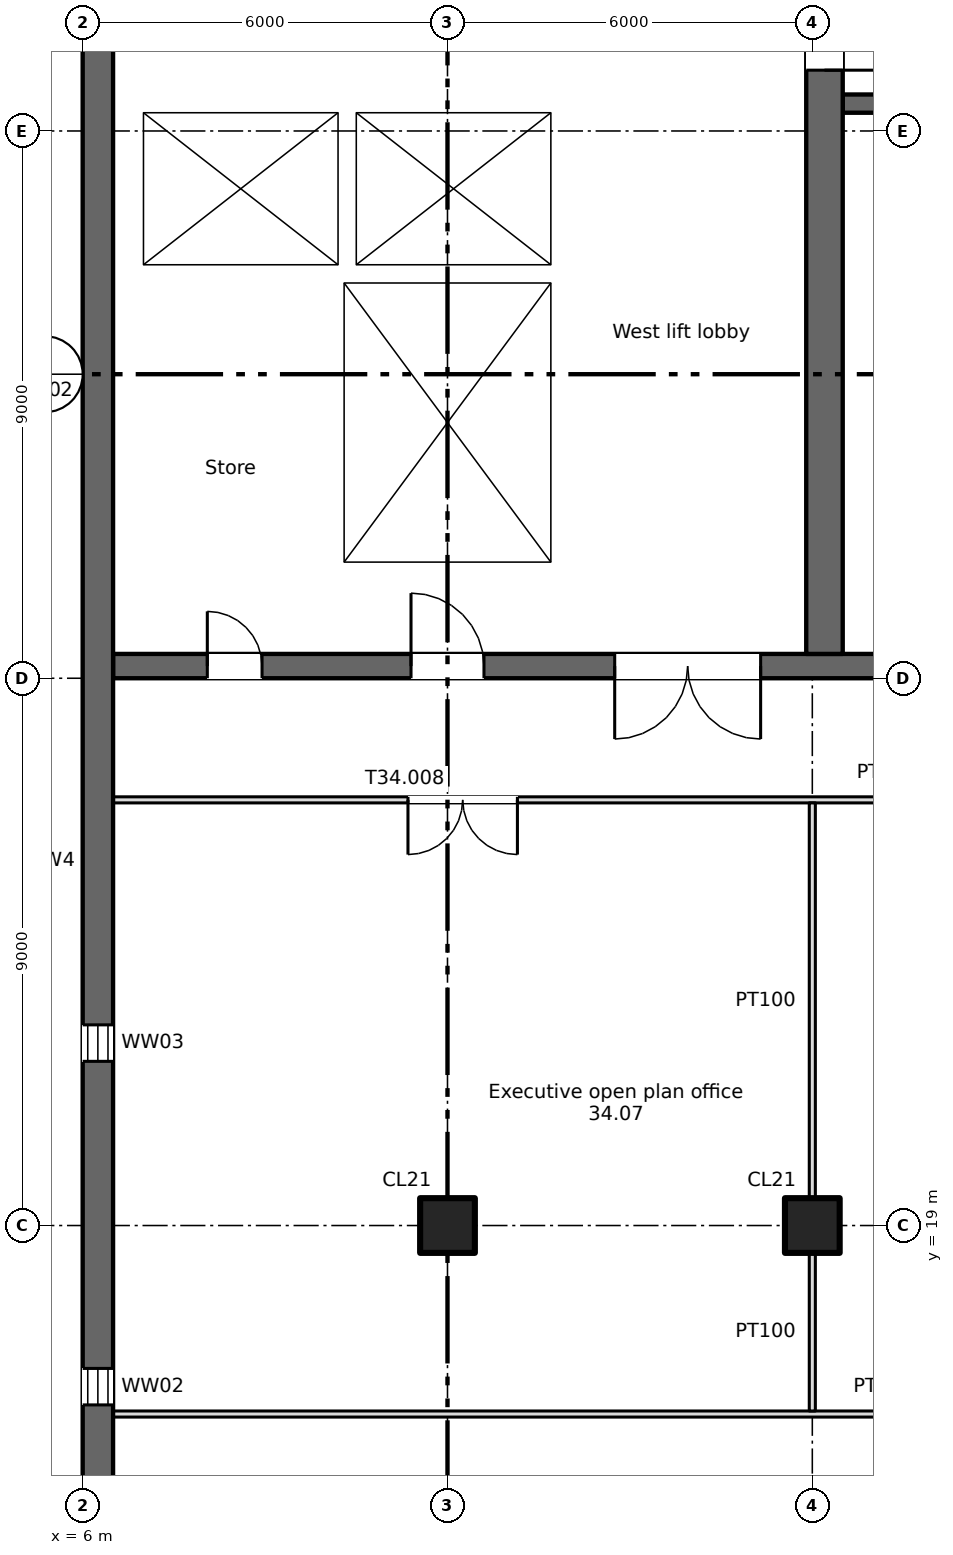
"""IFC4 building model, lengths in metres.
Left out: names, types, materials, properties, quantities, classifications, styles, units other than length and angle.
Written with IfcOpenShell. Run it as: python <this file> out.ifc"""

import sys

from ifc_helpers import new_model, si_unit, direction, frame, frame_2d, origin, origin_2d, place, context, subcontext, project, spatial, rectangle, extrude, element, fill, save


model = new_model("IFC4")
c1 = context("Model", 3, precision=1e-05, world=origin(), true_north=direction((0.0, 1.0)))
c2 = subcontext(c1, "Body", "Model", "MODEL_VIEW")
j1 = project(units=[si_unit("LENGTHUNIT", "METRE"), si_unit("PLANEANGLEUNIT", "RADIAN")], contexts=[c1])
p1 = place(None, origin())
s1 = spatial("IfcSite", under=j1, at=p1, CompositionType="ELEMENT")
p2 = place(p1, origin())
s2 = spatial("IfcBuilding", under=s1, at=p2, CompositionType="ELEMENT")
p3 = place(p2, frame((0.0, 0.0, 239.35)))
s3 = spatial("IfcBuildingStorey", under=s2, at=p3, CompositionType="ELEMENT", Elevation=239.35)
for number, where, z_axis, x_axis in (
    (1, (12.0, 19.0, 0.0), (0.0, 0.0, 1.0), (1.0, 0.0, 0.0)),
    (2, (18.0, 19.0, 0.0), (0.0, 0.0, 1.0), (1.0, 0.0, 0.0)),
):
    element("IfcColumn", number, at=place(p3, frame(where, z_axis=z_axis, x_axis=x_axis)), inside=s3, PredefinedType="COLUMN", context=c2, shape_type="SweptSolid", body=[
        extrude(rectangle(XDim=0.9, YDim=0.9, at=origin_2d()), origin(), (0.0, 0.0, 1.0), 3.4),
    ])
p4 = place(p3, frame((6.25, 8.5, 0.0), z_axis=(0.0, 0.0, 1.0), x_axis=(0.0, 1.0, 0.0)))
e3 = element("IfcWall", 3, at=p4, inside=s3, PredefinedType="SHEAR", context=c2, shape_type="SweptSolid", body=[
    extrude(rectangle(XDim=33.0, YDim=0.5, at=frame_2d((16.5, 0.0))), origin(), (0.0, 0.0, 1.0), 3.4),
])
p5 = place(p4, frame((1.6, 0.0, 0.6)))
e4 = element("IfcOpeningElement", 4, at=p5, cuts=e3, PredefinedType="OPENING", context=c2, shape_type="SweptSolid", body=[
    extrude(rectangle(XDim=0.6, YDim=2.4, at=frame_2d((0.3, 1.2))), frame((0.0, 0.26, 0.0), z_axis=(0.0, -1.0, 0.0), x_axis=(1.0, 0.0, 0.0)), (0.0, 0.0, 1.0), 0.52),
])
p6 = place(p4, frame((7.55, 0.0, 0.6)))
e5 = element("IfcOpeningElement", 5, at=p6, cuts=e3, PredefinedType="OPENING", context=c2, shape_type="SweptSolid", body=[
    extrude(rectangle(XDim=0.6, YDim=2.4, at=frame_2d((0.3, 1.2))), frame((0.0, 0.26, 0.0), z_axis=(0.0, -1.0, 0.0), x_axis=(1.0, 0.0, 0.0)), (0.0, 0.0, 1.0), 0.52),
])
p7 = place(p4, frame((13.2, 0.0, 0.6)))
e6 = element("IfcOpeningElement", 6, at=p7, cuts=e3, PredefinedType="OPENING", context=c2, shape_type="SweptSolid", body=[
    extrude(rectangle(XDim=0.6, YDim=2.4, at=frame_2d((0.3, 1.2))), frame((0.0, 0.26, 0.0), z_axis=(0.0, -1.0, 0.0), x_axis=(1.0, 0.0, 0.0)), (0.0, 0.0, 1.0), 0.52),
])
p8 = place(p3, frame((6.5, 28.2, 0.0), z_axis=(0.0, 0.0, 1.0), x_axis=(1.0, 0.0, 0.0)))
e7 = element("IfcWall", 7, at=p8, inside=s3, PredefinedType="SHEAR", context=c2, shape_type="SweptSolid", body=[
    extrude(rectangle(XDim=58.0, YDim=0.4, at=frame_2d((29.0, 0.0))), origin(), (0.0, 0.0, 1.0), 3.4),
])
p9 = place(p8, frame((14.05, 0.0, 0.0)))
e8 = element("IfcOpeningElement", 8, at=p9, cuts=e7, PredefinedType="OPENING", context=c2, shape_type="SweptSolid", body=[
    extrude(rectangle(XDim=0.9, YDim=2.1, at=frame_2d((0.45, 1.05))), frame((0.0, 0.21, 0.0), z_axis=(0.0, -1.0, 0.0), x_axis=(1.0, 0.0, 0.0)), (0.0, 0.0, 1.0), 0.42),
])
p10 = place(p8, frame((48.762, 0.0, 0.0)))
e9 = element("IfcOpeningElement", 9, at=p10, cuts=e7, PredefinedType="OPENING", context=c2, shape_type="SweptSolid", body=[
    extrude(rectangle(XDim=0.9, YDim=2.1, at=frame_2d((0.45, 1.05))), frame((0.0, 0.21, 0.0), z_axis=(0.0, -1.0, 0.0), x_axis=(1.0, 0.0, 0.0)), (0.0, 0.0, 1.0), 0.42),
])
p11 = place(p8, frame((51.337, 0.0, 0.0)))
e10 = element("IfcOpeningElement", 10, at=p11, cuts=e7, PredefinedType="OPENING", context=c2, shape_type="SweptSolid", body=[
    extrude(rectangle(XDim=0.9, YDim=2.1, at=frame_2d((0.45, 1.05))), frame((0.0, 0.21, 0.0), z_axis=(0.0, -1.0, 0.0), x_axis=(1.0, 0.0, 0.0)), (0.0, 0.0, 1.0), 0.42),
])
p12 = place(p8, frame((1.55, 0.0, 0.0)))
e11 = element("IfcOpeningElement", 11, at=p12, cuts=e7, PredefinedType="OPENING", context=c2, shape_type="SweptSolid", body=[
    extrude(rectangle(XDim=0.9, YDim=2.1, at=frame_2d((0.45, 1.05))), frame((0.0, 0.21, 0.0), z_axis=(0.0, -1.0, 0.0), x_axis=(1.0, 0.0, 0.0)), (0.0, 0.0, 1.0), 0.42),
])
p13 = place(p8, frame((4.9, 0.0, 0.0)))
e12 = element("IfcOpeningElement", 12, at=p13, cuts=e7, PredefinedType="OPENING", context=c2, shape_type="SweptSolid", body=[
    extrude(rectangle(XDim=1.2, YDim=2.1, at=frame_2d((0.6, 1.05))), frame((0.0, 0.21, 0.0), z_axis=(0.0, -1.0, 0.0), x_axis=(1.0, 0.0, 0.0)), (0.0, 0.0, 1.0), 0.42),
])
p14 = place(p8, frame((31.9, 0.0, 0.0)))
e13 = element("IfcOpeningElement", 13, at=p14, cuts=e7, PredefinedType="OPENING", context=c2, shape_type="SweptSolid", body=[
    extrude(rectangle(XDim=1.2, YDim=2.1, at=frame_2d((0.6, 1.05))), frame((0.0, 0.21, 0.0), z_axis=(0.0, -1.0, 0.0), x_axis=(1.0, 0.0, 0.0)), (0.0, 0.0, 1.0), 0.42),
])
p15 = place(p8, frame((55.4, 0.0, 0.0)))
e14 = element("IfcOpeningElement", 14, at=p15, cuts=e7, PredefinedType="OPENING", context=c2, shape_type="SweptSolid", body=[
    extrude(rectangle(XDim=1.2, YDim=2.1, at=frame_2d((0.6, 1.05))), frame((0.0, 0.21, 0.0), z_axis=(0.0, -1.0, 0.0), x_axis=(1.0, 0.0, 0.0)), (0.0, 0.0, 1.0), 0.42),
])
p16 = place(p8, frame((21.9, 0.0, 0.0)))
e15 = element("IfcOpeningElement", 15, at=p16, cuts=e7, PredefinedType="OPENING", context=c2, shape_type="SweptSolid", body=[
    extrude(rectangle(XDim=1.2, YDim=2.1, at=frame_2d((0.6, 1.05))), frame((0.0, 0.21, 0.0), z_axis=(0.0, -1.0, 0.0), x_axis=(1.0, 0.0, 0.0)), (0.0, 0.0, 1.0), 0.42),
])
p17 = place(p8, frame((41.9, 0.0, 0.0)))
e16 = element("IfcOpeningElement", 16, at=p17, cuts=e7, PredefinedType="OPENING", context=c2, shape_type="SweptSolid", body=[
    extrude(rectangle(XDim=1.2, YDim=2.1, at=frame_2d((0.6, 1.05))), frame((0.0, 0.21, 0.0), z_axis=(0.0, -1.0, 0.0), x_axis=(1.0, 0.0, 0.0)), (0.0, 0.0, 1.0), 0.42),
])
p18 = place(p8, frame((25.05, 0.0, 0.0)))
e17 = element("IfcOpeningElement", 17, at=p18, cuts=e7, PredefinedType="OPENING", context=c2, shape_type="SweptSolid", body=[
    extrude(rectangle(XDim=2.4, YDim=2.1, at=frame_2d((1.2, 1.05))), frame((0.0, 0.21, 0.0), z_axis=(0.0, -1.0, 0.0), x_axis=(1.0, 0.0, 0.0)), (0.0, 0.0, 1.0), 0.42),
])
p19 = place(p8, frame((37.55, 0.0, 0.0)))
e18 = element("IfcOpeningElement", 18, at=p19, cuts=e7, PredefinedType="OPENING", context=c2, shape_type="SweptSolid", body=[
    extrude(rectangle(XDim=2.4, YDim=2.1, at=frame_2d((1.2, 1.05))), frame((0.0, 0.21, 0.0), z_axis=(0.0, -1.0, 0.0), x_axis=(1.0, 0.0, 0.0)), (0.0, 0.0, 1.0), 0.42),
])
p20 = place(p8, frame((8.25, 0.0, 0.0)))
e19 = element("IfcOpeningElement", 19, at=p20, cuts=e7, PredefinedType="OPENING", context=c2, shape_type="SweptSolid", body=[
    extrude(rectangle(XDim=2.4, YDim=2.1, at=frame_2d((1.2, 1.05))), frame((0.0, 0.21, 0.0), z_axis=(0.0, -1.0, 0.0), x_axis=(1.0, 0.0, 0.0)), (0.0, 0.0, 1.0), 0.42),
])
p21 = place(p8, frame((29.05, 0.0, 0.0)))
e20 = element("IfcOpeningElement", 20, at=p21, cuts=e7, PredefinedType="OPENING", context=c2, shape_type="SweptSolid", body=[
    extrude(rectangle(XDim=0.9, YDim=2.1, at=frame_2d((0.45, 1.05))), frame((0.0, 0.21, 0.0), z_axis=(0.0, -1.0, 0.0), x_axis=(1.0, 0.0, 0.0)), (0.0, 0.0, 1.0), 0.42),
])
p22 = place(p8, frame((35.05, 0.0, 0.0)))
e21 = element("IfcOpeningElement", 21, at=p22, cuts=e7, PredefinedType="OPENING", context=c2, shape_type="SweptSolid", body=[
    extrude(rectangle(XDim=0.9, YDim=2.1, at=frame_2d((0.45, 1.05))), frame((0.0, 0.21, 0.0), z_axis=(0.0, -1.0, 0.0), x_axis=(1.0, 0.0, 0.0)), (0.0, 0.0, 1.0), 0.42),
])
p23 = place(p3, frame((6.75, 28.4, 0.0), z_axis=(0.0, 0.0, 1.0), x_axis=(0.0, 1.0, 0.0)))
e22 = element("IfcWall", 22, at=p23, inside=s3, PredefinedType="SHEAR", context=c2, shape_type="SweptSolid", body=[
    extrude(rectangle(XDim=12.85, YDim=0.5, at=frame_2d((6.425, 0.0))), origin(), (0.0, 0.0, 1.0), 3.4),
])
p24 = place(p3, frame((18.2, 28.4, 0.0), z_axis=(0.0, 0.0, 1.0), x_axis=(0.0, 1.0, 0.0)))
e23 = element("IfcWall", 23, at=p24, inside=s3, PredefinedType="SHEAR", context=c2, shape_type="SweptSolid", body=[
    extrude(rectangle(XDim=17.0, YDim=0.6, at=frame_2d((8.5, 0.0))), origin(), (0.0, 0.0, 1.0), 3.4),
])
p25 = place(p24, frame((9.6, 0.0, 0.0)))
e24 = element("IfcOpeningElement", 24, at=p25, cuts=e23, PredefinedType="OPENING", context=c2, shape_type="SweptSolid", body=[
    extrude(rectangle(XDim=2.0, YDim=2.1, at=frame_2d((1.0, 1.05))), frame((0.0, 0.31, 0.0), z_axis=(0.0, -1.0, 0.0), x_axis=(1.0, 0.0, 0.0)), (0.0, 0.0, 1.0), 0.62),
])
p26 = place(p24, frame((15.45, 0.0, 0.0)))
e25 = element("IfcOpeningElement", 25, at=p26, cuts=e23, PredefinedType="OPENING", context=c2, shape_type="SweptSolid", body=[
    extrude(rectangle(XDim=1.2, YDim=2.1, at=frame_2d((0.6, 1.05))), frame((0.0, 0.31, 0.0), z_axis=(0.0, -1.0, 0.0), x_axis=(1.0, 0.0, 0.0)), (0.0, 0.0, 1.0), 0.62),
])
for number, where, z_axis, x_axis in (
    (26, (10.15, 28.4, 0.0), (0.0, 0.0, 1.0), (0.0, 1.0, 0.0)),
    (27, (13.85, 28.4, 0.0), (0.0, 0.0, 1.0), (0.0, 1.0, 0.0)),
):
    element("IfcWall", number, at=place(p3, frame(where, z_axis=z_axis, x_axis=x_axis)), inside=s3, PredefinedType="SHEAR", context=c2, shape_type="SweptSolid", body=[
        extrude(rectangle(XDim=6.1, YDim=0.3, at=frame_2d((3.05, 0.0))), origin(), (0.0, 0.0, 1.0), 3.4),
    ])
p27 = place(p3, frame((7.0, 34.65, 0.0), z_axis=(0.0, 0.0, 1.0), x_axis=(1.0, 0.0, 0.0)))
e28 = element("IfcWall", 28, at=p27, inside=s3, PredefinedType="SHEAR", context=c2, shape_type="SweptSolid", body=[
    extrude(rectangle(XDim=7.0, YDim=0.3, at=frame_2d((3.5, 0.0))), origin(), (0.0, 0.0, 1.0), 3.4),
])
p28 = place(p3, frame((18.5, 34.65, 0.0), z_axis=(0.0, 0.0, 1.0), x_axis=(1.0, 0.0, 0.0)))
e29 = element("IfcWall", 29, at=p28, inside=s3, PredefinedType="SHEAR", context=c2, shape_type="SweptSolid", body=[
    extrude(rectangle(XDim=12.2, YDim=0.3, at=frame_2d((6.1, 0.0))), origin(), (0.0, 0.0, 1.0), 3.4),
])
p29 = place(p28, frame((9.8, 0.0, 0.0)))
e30 = element("IfcOpeningElement", 30, at=p29, cuts=e29, PredefinedType="OPENING", context=c2, shape_type="SweptSolid", body=[
    extrude(rectangle(XDim=1.1, YDim=2.1, at=frame_2d((0.55, 1.05))), frame((0.0, 0.16, 0.0), z_axis=(0.0, -1.0, 0.0), x_axis=(1.0, 0.0, 0.0)), (0.0, 0.0, 1.0), 0.32),
])
p30 = place(p3, frame((7.0, 37.45, 0.0), z_axis=(0.0, 0.0, 1.0), x_axis=(1.0, 0.0, 0.0)))
e31 = element("IfcWall", 31, at=p30, inside=s3, PredefinedType="SHEAR", context=c2, shape_type="SweptSolid", body=[
    extrude(rectangle(XDim=7.0, YDim=0.3, at=frame_2d((3.5, 0.0))), origin(), (0.0, 0.0, 1.0), 3.4),
])
p31 = place(p30, frame((1.05, 0.0, 0.0)))
e32 = element("IfcOpeningElement", 32, at=p31, cuts=e31, PredefinedType="OPENING", context=c2, shape_type="SweptSolid", body=[
    extrude(rectangle(XDim=1.1, YDim=2.1, at=frame_2d((0.55, 1.05))), frame((0.0, 0.16, 0.0), z_axis=(0.0, -1.0, 0.0), x_axis=(1.0, 0.0, 0.0)), (0.0, 0.0, 1.0), 0.32),
])
p32 = place(p30, frame((4.55, 0.0, 0.0)))
e33 = element("IfcOpeningElement", 33, at=p32, cuts=e31, PredefinedType="OPENING", context=c2, shape_type="SweptSolid", body=[
    extrude(rectangle(XDim=1.1, YDim=2.1, at=frame_2d((0.55, 1.05))), frame((0.0, 0.16, 0.0), z_axis=(0.0, -1.0, 0.0), x_axis=(1.0, 0.0, 0.0)), (0.0, 0.0, 1.0), 0.32),
])
p33 = place(p3, frame((30.7, 37.45, 0.0), z_axis=(0.0, 0.0, 1.0), x_axis=(-1.0, 0.0, 0.0)))
e34 = element("IfcWall", 34, at=p33, inside=s3, PredefinedType="SHEAR", context=c2, shape_type="SweptSolid", body=[
    extrude(rectangle(XDim=12.2, YDim=0.3, at=frame_2d((6.1, 0.0))), origin(), (0.0, 0.0, 1.0), 3.4),
])
p34 = place(p33, frame((7.4, 0.0, 0.0)))
e35 = element("IfcOpeningElement", 35, at=p34, cuts=e34, PredefinedType="OPENING", context=c2, shape_type="SweptSolid", body=[
    extrude(rectangle(XDim=0.9, YDim=2.1, at=frame_2d((0.45, 1.05))), frame((0.0, 0.16, 0.0), z_axis=(0.0, -1.0, 0.0), x_axis=(1.0, 0.0, 0.0)), (0.0, 0.0, 1.0), 0.32),
])
for number, where, z_axis, x_axis in (
    (36, (13.85, 34.8, 0.0), (0.0, 0.0, 1.0), (0.0, 1.0, 0.0)),
    (37, (10.35, 34.8, 0.0), (0.0, 0.0, 1.0), (0.0, 1.0, 0.0)),
):
    element("IfcWall", number, at=place(p3, frame(where, z_axis=z_axis, x_axis=x_axis)), inside=s3, PredefinedType="SHEAR", context=c2, shape_type="SweptSolid", body=[
        extrude(rectangle(XDim=2.5, YDim=0.3, at=frame_2d((1.25, 0.0))), origin(), (0.0, 0.0, 1.0), 3.4),
    ])
p35 = place(p3, frame((6.5, 15.9, 0.0), z_axis=(0.0, 0.0, 1.0), x_axis=(1.0, 0.0, 0.0)))
e38 = element("IfcWall", 38, at=p35, inside=s3, PredefinedType="PARTITIONING", context=c2, shape_type="SweptSolid", body=[
    extrude(rectangle(XDim=25.35, YDim=0.1, at=frame_2d((12.675, 0.0))), origin(), (0.0, 0.0, 1.0), 3.4),
])
p36 = place(p3, frame((6.5, 26.0, 0.0), z_axis=(0.0, 0.0, 1.0), x_axis=(1.0, 0.0, 0.0)))
e39 = element("IfcWall", 39, at=p36, inside=s3, PredefinedType="PARTITIONING", context=c2, shape_type="SweptSolid", body=[
    extrude(rectangle(XDim=25.45, YDim=0.1, at=frame_2d((12.725, 0.0))), origin(), (0.0, 0.0, 1.0), 3.4),
])
p37 = place(p36, frame((17.55, 0.0, 0.0)))
e40 = element("IfcOpeningElement", 40, at=p37, cuts=e39, PredefinedType="OPENING", context=c2, shape_type="SweptSolid", body=[
    extrude(rectangle(XDim=1.8, YDim=2.1, at=frame_2d((0.9, 1.05))), frame((0.0, 0.06, 0.0), z_axis=(0.0, -1.0, 0.0), x_axis=(1.0, 0.0, 0.0)), (0.0, 0.0, 1.0), 0.12),
])
p38 = place(p36, frame((4.85, 0.0, 0.0)))
e41 = element("IfcOpeningElement", 41, at=p38, cuts=e39, PredefinedType="OPENING", context=c2, shape_type="SweptSolid", body=[
    extrude(rectangle(XDim=1.8, YDim=2.1, at=frame_2d((0.9, 1.05))), frame((0.0, 0.06, 0.0), z_axis=(0.0, -1.0, 0.0), x_axis=(1.0, 0.0, 0.0)), (0.0, 0.0, 1.0), 0.12),
])
p39 = place(p3, frame((18.0, 15.95, 0.0), z_axis=(0.0, 0.0, 1.0), x_axis=(0.0, 1.0, 0.0)))
e42 = element("IfcWall", 42, at=p39, inside=s3, PredefinedType="PARTITIONING", context=c2, shape_type="SweptSolid", body=[
    extrude(rectangle(XDim=2.6, YDim=0.1, at=frame_2d((1.3, 0.0))), origin(), (0.0, 0.0, 1.0), 3.4),
])
p40 = place(p3, frame((18.0, 19.45, 0.0), z_axis=(0.0, 0.0, 1.0), x_axis=(0.0, 1.0, 0.0)))
e43 = element("IfcWall", 43, at=p40, inside=s3, PredefinedType="PARTITIONING", context=c2, shape_type="SweptSolid", body=[
    extrude(rectangle(XDim=6.5, YDim=0.1, at=frame_2d((3.25, 0.0))), origin(), (0.0, 0.0, 1.0), 3.4),
])
p41 = place(p6, origin())
e44 = element("IfcWindow", 44, at=p41, inside=s3, PartitioningType="SINGLE_PANEL", PredefinedType="WINDOW", context=c2, shape_type="SweptSolid", body=[
    extrude(rectangle(XDim=0.6, YDim=2.4, at=frame_2d((0.3, 1.2))), frame((0.0, 0.03, 0.0), z_axis=(0.0, -1.0, 0.0), x_axis=(1.0, 0.0, 0.0)), (0.0, 0.0, 1.0), 0.06),
])
fill(e5, e44)
p42 = place(p7, origin())
e45 = element("IfcWindow", 45, at=p42, inside=s3, PartitioningType="SINGLE_PANEL", PredefinedType="WINDOW", context=c2, shape_type="SweptSolid", body=[
    extrude(rectangle(XDim=0.6, YDim=2.4, at=frame_2d((0.3, 1.2))), frame((0.0, 0.03, 0.0), z_axis=(0.0, -1.0, 0.0), x_axis=(1.0, 0.0, 0.0)), (0.0, 0.0, 1.0), 0.06),
])
fill(e6, e45)
p43 = place(p12, origin())
e46 = element("IfcDoor", 46, at=p43, inside=s3, OperationType="SINGLE_SWING_LEFT", PredefinedType="DOOR", context=c2, shape_type="SweptSolid", body=[
    extrude(rectangle(XDim=0.9, YDim=2.1, at=frame_2d((0.45, 1.05))), frame((0.0, 0.025, 0.0), z_axis=(0.0, -1.0, 0.0), x_axis=(1.0, 0.0, 0.0)), (0.0, 0.0, 1.0), 0.05),
])
fill(e11, e46)
p44 = place(p31, origin())
e47 = element("IfcDoor", 47, at=p44, inside=s3, OperationType="SLIDING_TO_LEFT", PredefinedType="DOOR", context=c2, shape_type="SweptSolid", body=[
    extrude(rectangle(XDim=1.1, YDim=2.1, at=frame_2d((0.55, 1.05))), frame((0.0, 0.025, 0.0), z_axis=(0.0, -1.0, 0.0), x_axis=(1.0, 0.0, 0.0)), (0.0, 0.0, 1.0), 0.05),
])
fill(e32, e47)
p45 = place(p32, origin())
e48 = element("IfcDoor", 48, at=p45, inside=s3, OperationType="SLIDING_TO_LEFT", PredefinedType="DOOR", context=c2, shape_type="SweptSolid", body=[
    extrude(rectangle(XDim=1.1, YDim=2.1, at=frame_2d((0.55, 1.05))), frame((0.0, 0.025, 0.0), z_axis=(0.0, -1.0, 0.0), x_axis=(1.0, 0.0, 0.0)), (0.0, 0.0, 1.0), 0.05),
])
fill(e33, e48)
p46 = place(p13, origin())
e49 = element("IfcDoor", 49, at=p46, inside=s3, OperationType="SINGLE_SWING_LEFT", PredefinedType="DOOR", context=c2, shape_type="SweptSolid", body=[
    extrude(rectangle(XDim=1.2, YDim=2.1, at=frame_2d((0.6, 1.05))), frame((0.0, 0.025, 0.0), z_axis=(0.0, -1.0, 0.0), x_axis=(1.0, 0.0, 0.0)), (0.0, 0.0, 1.0), 0.05),
])
fill(e12, e49)
p47 = place(p20, origin())
e50 = element("IfcDoor", 50, at=p47, inside=s3, OperationType="DOUBLE_DOOR_SINGLE_SWING", PredefinedType="DOOR", context=c2, shape_type="SweptSolid", body=[
    extrude(rectangle(XDim=2.4, YDim=2.1, at=frame_2d((1.2, 1.05))), frame((0.0, 0.025, 0.0), z_axis=(0.0, -1.0, 0.0), x_axis=(1.0, 0.0, 0.0)), (0.0, 0.0, 1.0), 0.05),
])
fill(e19, e50)
p48 = place(p25, origin())
e51 = element("IfcDoor", 51, at=p48, inside=s3, OperationType="DOUBLE_DOOR_SINGLE_SWING", PredefinedType="DOOR", context=c2, shape_type="SweptSolid", body=[
    extrude(rectangle(XDim=2.0, YDim=2.1, at=frame_2d((1.0, 1.05))), frame((0.0, 0.025, 0.0), z_axis=(0.0, -1.0, 0.0), x_axis=(1.0, 0.0, 0.0)), (0.0, 0.0, 1.0), 0.05),
])
fill(e24, e51)
p49 = place(p38, origin())
e52 = element("IfcDoor", 52, at=p49, inside=s3, OperationType="DOUBLE_DOOR_SINGLE_SWING", PredefinedType="DOOR", context=c2, shape_type="SweptSolid", body=[
    extrude(rectangle(XDim=1.8, YDim=2.1, at=frame_2d((0.9, 1.05))), frame((0.0, 0.025, 0.0), z_axis=(0.0, -1.0, 0.0), x_axis=(1.0, 0.0, 0.0)), (0.0, 0.0, 1.0), 0.05),
])
fill(e41, e52)
save(model, sys.argv[1])
